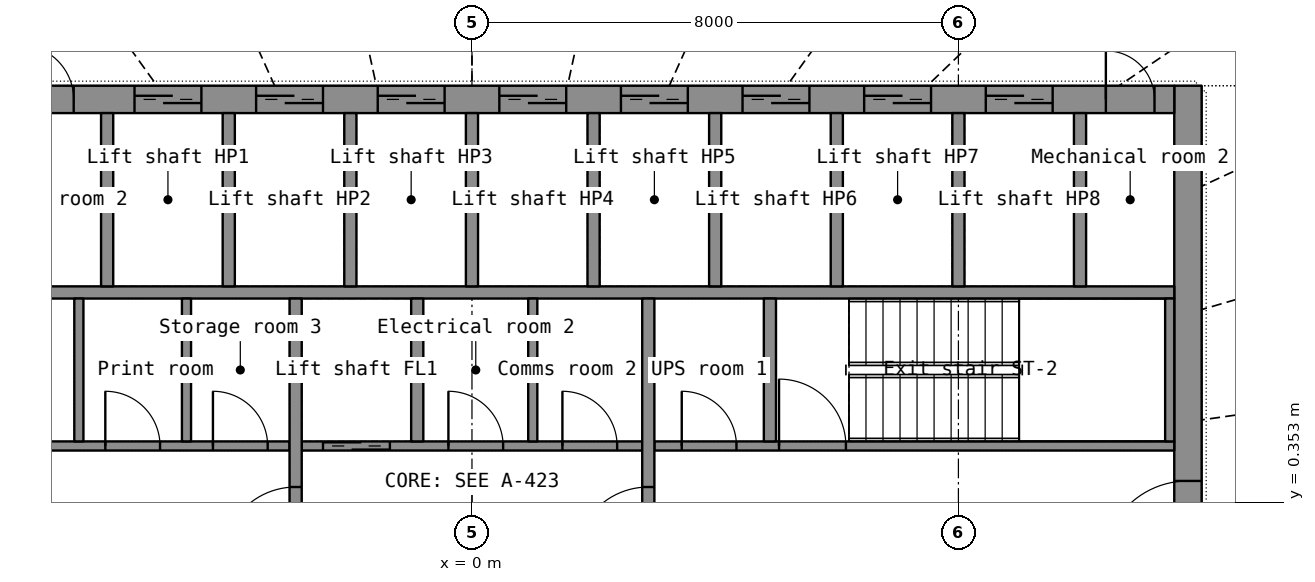
"""IFC4 building model, lengths in metres.
Left out: names, types, materials, properties, quantities, classifications, styles, units other than length and angle.
Written with IfcOpenShell. Run it as: python <this file> out.ifc"""

import sys

from ifc_helpers import new_model, si_unit, direction, frame, frame_2d, origin, place, context, subcontext, project, spatial, rectangle, extrude, element, fill, save


model = new_model("IFC4")
c1 = context("Model", 3, precision=1e-05, world=origin(), true_north=direction((0.0, 1.0)))
c2 = subcontext(c1, "Body", "Model", "MODEL_VIEW")
j1 = project(units=[si_unit("LENGTHUNIT", "METRE"), si_unit("PLANEANGLEUNIT", "RADIAN")], contexts=[c1])
p1 = place(None, origin())
s1 = spatial("IfcSite", under=j1, at=p1, CompositionType="ELEMENT")
p2 = place(p1, origin())
s2 = spatial("IfcBuilding", under=s1, at=p2, CompositionType="ELEMENT")
p3 = place(p2, frame((0.0, 0.0, 168.2)))
s3 = spatial("IfcBuildingStorey", under=s2, at=p3, CompositionType="ELEMENT", Elevation=168.2)
p4 = place(p3, frame((11.775, -7.2, 0.0), z_axis=(0.0, 0.0, 1.0), x_axis=(0.0, 1.0, 0.0)))
e1 = element("IfcWall", 1, at=p4, inside=s3, PredefinedType="SHEAR", context=c2, shape_type="SweptSolid", body=[
    extrude(rectangle(XDim=14.4, YDim=0.45, at=frame_2d((7.2, 0.0))), origin(), (0.0, 0.0, 1.0), 3.3),
])
p5 = place(p4, frame((6.5, 0.0, 0.0)))
e2 = element("IfcOpeningElement", 2, at=p5, cuts=e1, PredefinedType="OPENING", context=c2, shape_type="SweptSolid", body=[
    extrude(rectangle(XDim=1.4, YDim=2.2, at=frame_2d((0.7, 1.1))), frame((0.0, 0.235, 0.0), z_axis=(0.0, -1.0, 0.0), x_axis=(1.0, 0.0, 0.0)), (0.0, 0.0, 1.0), 0.47),
])
p6 = place(p3, frame((-11.55, 6.975, 0.0), z_axis=(0.0, 0.0, 1.0), x_axis=(1.0, 0.0, 0.0)))
e3 = element("IfcWall", 3, at=p6, inside=s3, PredefinedType="SHEAR", context=c2, shape_type="SweptSolid", body=[
    extrude(rectangle(XDim=23.1, YDim=0.45, at=frame_2d((11.55, 0.0))), origin(), (0.0, 0.0, 1.0), 3.3),
])
p7 = place(p6, frame((2.0, 0.0, 0.0)))
e4 = element("IfcOpeningElement", 4, at=p7, cuts=e3, PredefinedType="OPENING", context=c2, shape_type="SweptSolid", body=[
    extrude(rectangle(XDim=1.1, YDim=2.2, at=frame_2d((0.55, 1.1))), frame((0.0, 0.235, 0.0), z_axis=(0.0, -1.0, 0.0), x_axis=(1.0, 0.0, 0.0)), (0.0, 0.0, 1.0), 0.47),
])
p8 = place(p6, frame((6.0, 0.0, 0.0)))
e5 = element("IfcOpeningElement", 5, at=p8, cuts=e3, PredefinedType="OPENING", context=c2, shape_type="SweptSolid", body=[
    extrude(rectangle(XDim=1.1, YDim=2.2, at=frame_2d((0.55, 1.1))), frame((0.0, 0.235, 0.0), z_axis=(0.0, -1.0, 0.0), x_axis=(1.0, 0.0, 0.0)), (0.0, 0.0, 1.0), 0.47),
])
p9 = place(p6, frame((8.0, 0.0, 0.0)))
e6 = element("IfcOpeningElement", 6, at=p9, cuts=e3, PredefinedType="OPENING", context=c2, shape_type="SweptSolid", body=[
    extrude(rectangle(XDim=1.1, YDim=2.2, at=frame_2d((0.55, 1.1))), frame((0.0, 0.235, 0.0), z_axis=(0.0, -1.0, 0.0), x_axis=(1.0, 0.0, 0.0)), (0.0, 0.0, 1.0), 0.47),
])
p10 = place(p6, frame((10.0, 0.0, 0.0)))
e7 = element("IfcOpeningElement", 7, at=p10, cuts=e3, PredefinedType="OPENING", context=c2, shape_type="SweptSolid", body=[
    extrude(rectangle(XDim=1.1, YDim=2.2, at=frame_2d((0.55, 1.1))), frame((0.0, 0.235, 0.0), z_axis=(0.0, -1.0, 0.0), x_axis=(1.0, 0.0, 0.0)), (0.0, 0.0, 1.0), 0.47),
])
p11 = place(p6, frame((12.0, 0.0, 0.0)))
e8 = element("IfcOpeningElement", 8, at=p11, cuts=e3, PredefinedType="OPENING", context=c2, shape_type="SweptSolid", body=[
    extrude(rectangle(XDim=1.1, YDim=2.2, at=frame_2d((0.55, 1.1))), frame((0.0, 0.235, 0.0), z_axis=(0.0, -1.0, 0.0), x_axis=(1.0, 0.0, 0.0)), (0.0, 0.0, 1.0), 0.47),
])
p12 = place(p6, frame((14.0, 0.0, 0.0)))
e9 = element("IfcOpeningElement", 9, at=p12, cuts=e3, PredefinedType="OPENING", context=c2, shape_type="SweptSolid", body=[
    extrude(rectangle(XDim=1.1, YDim=2.2, at=frame_2d((0.55, 1.1))), frame((0.0, 0.235, 0.0), z_axis=(0.0, -1.0, 0.0), x_axis=(1.0, 0.0, 0.0)), (0.0, 0.0, 1.0), 0.47),
])
p13 = place(p6, frame((16.0, 0.0, 0.0)))
e10 = element("IfcOpeningElement", 10, at=p13, cuts=e3, PredefinedType="OPENING", context=c2, shape_type="SweptSolid", body=[
    extrude(rectangle(XDim=1.1, YDim=2.2, at=frame_2d((0.55, 1.1))), frame((0.0, 0.235, 0.0), z_axis=(0.0, -1.0, 0.0), x_axis=(1.0, 0.0, 0.0)), (0.0, 0.0, 1.0), 0.47),
])
p14 = place(p6, frame((18.0, 0.0, 0.0)))
e11 = element("IfcOpeningElement", 11, at=p14, cuts=e3, PredefinedType="OPENING", context=c2, shape_type="SweptSolid", body=[
    extrude(rectangle(XDim=1.1, YDim=2.2, at=frame_2d((0.55, 1.1))), frame((0.0, 0.235, 0.0), z_axis=(0.0, -1.0, 0.0), x_axis=(1.0, 0.0, 0.0)), (0.0, 0.0, 1.0), 0.47),
])
p15 = place(p6, frame((20.0, 0.0, 0.0)))
e12 = element("IfcOpeningElement", 12, at=p15, cuts=e3, PredefinedType="OPENING", context=c2, shape_type="SweptSolid", body=[
    extrude(rectangle(XDim=1.1, YDim=2.2, at=frame_2d((0.55, 1.1))), frame((0.0, 0.235, 0.0), z_axis=(0.0, -1.0, 0.0), x_axis=(1.0, 0.0, 0.0)), (0.0, 0.0, 1.0), 0.47),
])
p16 = place(p6, frame((4.1, 0.0, 0.0)))
e13 = element("IfcOpeningElement", 13, at=p16, cuts=e3, PredefinedType="OPENING", context=c2, shape_type="SweptSolid", body=[
    extrude(rectangle(XDim=0.9, YDim=2.1, at=frame_2d((0.45, 1.05))), frame((0.0, 0.235, 0.0), z_axis=(0.0, -1.0, 0.0), x_axis=(1.0, 0.0, 0.0)), (0.0, 0.0, 1.0), 0.47),
])
p17 = place(p6, frame((0.325, 0.0, 0.0)))
e14 = element("IfcOpeningElement", 14, at=p17, cuts=e3, PredefinedType="OPENING", context=c2, shape_type="SweptSolid", body=[
    extrude(rectangle(XDim=0.8, YDim=2.05, at=frame_2d((0.4, 1.025))), frame((0.0, 0.235, 0.0), z_axis=(0.0, -1.0, 0.0), x_axis=(1.0, 0.0, 0.0)), (0.0, 0.0, 1.0), 0.47),
])
p18 = place(p6, frame((21.975, 0.0, 0.0)))
e15 = element("IfcOpeningElement", 15, at=p18, cuts=e3, PredefinedType="OPENING", context=c2, shape_type="SweptSolid", body=[
    extrude(rectangle(XDim=0.8, YDim=2.05, at=frame_2d((0.4, 1.025))), frame((0.0, 0.235, 0.0), z_axis=(0.0, -1.0, 0.0), x_axis=(1.0, 0.0, 0.0)), (0.0, 0.0, 1.0), 0.47),
])
p19 = place(p3, frame((-11.55, 3.8, 0.0), z_axis=(0.0, 0.0, 1.0), x_axis=(1.0, 0.0, 0.0)))
e16 = element("IfcWall", 16, at=p19, inside=s3, PredefinedType="SHEAR", context=c2, shape_type="SweptSolid", body=[
    extrude(rectangle(XDim=23.1, YDim=0.2, at=frame_2d((11.55, 0.0))), origin(), (0.0, 0.0, 1.0), 3.3),
])
for number, where, z_axis, x_axis in (
    (17, (-6.0, 3.9, 0.0), (0.0, 0.0, 1.0), (0.0, 1.0, 0.0)),
    (18, (-4.0, 3.9, 0.0), (0.0, 0.0, 1.0), (0.0, 1.0, 0.0)),
    (19, (-2.0, 3.9, 0.0), (0.0, 0.0, 1.0), (0.0, 1.0, 0.0)),
    (20, (0.0, 3.9, 0.0), (0.0, 0.0, 1.0), (0.0, 1.0, 0.0)),
    (21, (2.0, 3.9, 0.0), (0.0, 0.0, 1.0), (0.0, 1.0, 0.0)),
    (22, (4.0, 3.9, 0.0), (0.0, 0.0, 1.0), (0.0, 1.0, 0.0)),
    (23, (6.0, 3.9, 0.0), (0.0, 0.0, 1.0), (0.0, 1.0, 0.0)),
    (24, (8.0, 3.9, 0.0), (0.0, 0.0, 1.0), (0.0, 1.0, 0.0)),
    (25, (10.0, 3.9, 0.0), (0.0, 0.0, 1.0), (0.0, 1.0, 0.0)),
):
    element("IfcWall", number, at=place(p3, frame(where, z_axis=z_axis, x_axis=x_axis)), inside=s3, PredefinedType="SHEAR", context=c2, shape_type="SweptSolid", body=[
        extrude(rectangle(XDim=2.85, YDim=0.2, at=frame_2d((1.425, 0.0))), origin(), (0.0, 0.0, 1.0), 3.3),
    ])
p20 = place(p3, frame((-11.55, 1.275, 0.0), z_axis=(0.0, 0.0, 1.0), x_axis=(1.0, 0.0, 0.0)))
e26 = element("IfcWall", 26, at=p20, inside=s3, PredefinedType="PARTITIONING", context=c2, shape_type="SweptSolid", body=[
    extrude(rectangle(XDim=8.55, YDim=0.15, at=frame_2d((4.275, 0.0))), origin(), (0.0, 0.0, 1.0), 3.3),
])
p21 = place(p20, frame((0.79, 0.0, 0.0)))
e27 = element("IfcOpeningElement", 27, at=p21, cuts=e26, PredefinedType="OPENING", context=c2, shape_type="SweptSolid", body=[
    extrude(rectangle(XDim=0.85, YDim=2.1, at=frame_2d((0.425, 1.05))), frame((0.0, 0.085, 0.0), z_axis=(0.0, -1.0, 0.0), x_axis=(1.0, 0.0, 0.0)), (0.0, 0.0, 1.0), 0.17),
])
p22 = place(p20, frame((3.37, 0.0, 0.0)))
e28 = element("IfcOpeningElement", 28, at=p22, cuts=e26, PredefinedType="OPENING", context=c2, shape_type="SweptSolid", body=[
    extrude(rectangle(XDim=0.85, YDim=2.1, at=frame_2d((0.425, 1.05))), frame((0.0, 0.085, 0.0), z_axis=(0.0, -1.0, 0.0), x_axis=(1.0, 0.0, 0.0)), (0.0, 0.0, 1.0), 0.17),
])
p23 = place(p20, frame((5.52, 0.0, 0.0)))
e29 = element("IfcOpeningElement", 29, at=p23, cuts=e26, PredefinedType="OPENING", context=c2, shape_type="SweptSolid", body=[
    extrude(rectangle(XDim=0.9, YDim=2.1, at=frame_2d((0.45, 1.05))), frame((0.0, 0.085, 0.0), z_axis=(0.0, -1.0, 0.0), x_axis=(1.0, 0.0, 0.0)), (0.0, 0.0, 1.0), 0.17),
])
p24 = place(p20, frame((7.29, 0.0, 0.0)))
e30 = element("IfcOpeningElement", 30, at=p24, cuts=e26, PredefinedType="OPENING", context=c2, shape_type="SweptSolid", body=[
    extrude(rectangle(XDim=0.9, YDim=2.1, at=frame_2d((0.45, 1.05))), frame((0.0, 0.085, 0.0), z_axis=(0.0, -1.0, 0.0), x_axis=(1.0, 0.0, 0.0)), (0.0, 0.0, 1.0), 0.17),
])
p25 = place(p3, frame((-2.8, 1.275, 0.0), z_axis=(0.0, 0.0, 1.0), x_axis=(1.0, 0.0, 0.0)))
e31 = element("IfcWall", 31, at=p25, inside=s3, PredefinedType="SHEAR", context=c2, shape_type="SweptSolid", body=[
    extrude(rectangle(XDim=5.6, YDim=0.15, at=frame_2d((2.8, 0.0))), origin(), (0.0, 0.0, 1.0), 3.3),
])
p26 = place(p25, frame((0.35, 0.0, 0.0)))
e32 = element("IfcOpeningElement", 32, at=p26, cuts=e31, PredefinedType="OPENING", context=c2, shape_type="SweptSolid", body=[
    extrude(rectangle(XDim=1.1, YDim=2.2, at=frame_2d((0.55, 1.1))), frame((0.0, 0.085, 0.0), z_axis=(0.0, -1.0, 0.0), x_axis=(1.0, 0.0, 0.0)), (0.0, 0.0, 1.0), 0.17),
])
p27 = place(p25, frame((2.413, 0.0, 0.0)))
e33 = element("IfcOpeningElement", 33, at=p27, cuts=e31, PredefinedType="OPENING", context=c2, shape_type="SweptSolid", body=[
    extrude(rectangle(XDim=0.9, YDim=2.1, at=frame_2d((0.45, 1.05))), frame((0.0, 0.085, 0.0), z_axis=(0.0, -1.0, 0.0), x_axis=(1.0, 0.0, 0.0)), (0.0, 0.0, 1.0), 0.17),
])
p28 = place(p25, frame((4.288, 0.0, 0.0)))
e34 = element("IfcOpeningElement", 34, at=p28, cuts=e31, PredefinedType="OPENING", context=c2, shape_type="SweptSolid", body=[
    extrude(rectangle(XDim=0.9, YDim=2.1, at=frame_2d((0.45, 1.05))), frame((0.0, 0.085, 0.0), z_axis=(0.0, -1.0, 0.0), x_axis=(1.0, 0.0, 0.0)), (0.0, 0.0, 1.0), 0.17),
])
p29 = place(p3, frame((3.0, 1.275, 0.0), z_axis=(0.0, 0.0, 1.0), x_axis=(1.0, 0.0, 0.0)))
e35 = element("IfcWall", 35, at=p29, inside=s3, PredefinedType="SHEAR", context=c2, shape_type="SweptSolid", body=[
    extrude(rectangle(XDim=8.55, YDim=0.15, at=frame_2d((4.275, 0.0))), origin(), (0.0, 0.0, 1.0), 3.3),
])
p30 = place(p29, frame((2.05, 0.0, 0.0)))
e36 = element("IfcOpeningElement", 36, at=p30, cuts=e35, PredefinedType="OPENING", context=c2, shape_type="SweptSolid", body=[
    extrude(rectangle(XDim=1.1, YDim=2.15, at=frame_2d((0.55, 1.075))), frame((0.0, 0.085, 0.0), z_axis=(0.0, -1.0, 0.0), x_axis=(1.0, 0.0, 0.0)), (0.0, 0.0, 1.0), 0.17),
])
p31 = place(p29, frame((0.45, 0.0, 0.0)))
e37 = element("IfcOpeningElement", 37, at=p31, cuts=e35, PredefinedType="OPENING", context=c2, shape_type="SweptSolid", body=[
    extrude(rectangle(XDim=0.9, YDim=2.1, at=frame_2d((0.45, 1.05))), frame((0.0, 0.085, 0.0), z_axis=(0.0, -1.0, 0.0), x_axis=(1.0, 0.0, 0.0)), (0.0, 0.0, 1.0), 0.17),
])
p32 = place(p3, frame((-2.9, -3.7, 0.0), z_axis=(0.0, 0.0, 1.0), x_axis=(0.0, 1.0, 0.0)))
e38 = element("IfcWall", 38, at=p32, inside=s3, PredefinedType="SHEAR", context=c2, shape_type="SweptSolid", body=[
    extrude(rectangle(XDim=7.4, YDim=0.2, at=frame_2d((3.7, 0.0))), origin(), (0.0, 0.0, 1.0), 3.3),
])
p33 = place(p32, frame((3.1, 0.0, 0.0)))
e39 = element("IfcOpeningElement", 39, at=p33, cuts=e38, PredefinedType="OPENING", context=c2, shape_type="SweptSolid", body=[
    extrude(rectangle(XDim=1.2, YDim=2.2, at=frame_2d((0.6, 1.1))), frame((0.0, 0.11, 0.0), z_axis=(0.0, -1.0, 0.0), x_axis=(1.0, 0.0, 0.0)), (0.0, 0.0, 1.0), 0.22),
])
p34 = place(p3, frame((2.9, -3.7, 0.0), z_axis=(0.0, 0.0, 1.0), x_axis=(0.0, 1.0, 0.0)))
e40 = element("IfcWall", 40, at=p34, inside=s3, PredefinedType="SHEAR", context=c2, shape_type="SweptSolid", body=[
    extrude(rectangle(XDim=7.4, YDim=0.2, at=frame_2d((3.7, 0.0))), origin(), (0.0, 0.0, 1.0), 3.3),
])
p35 = place(p34, frame((3.1, 0.0, 0.0)))
e41 = element("IfcOpeningElement", 41, at=p35, cuts=e40, PredefinedType="OPENING", context=c2, shape_type="SweptSolid", body=[
    extrude(rectangle(XDim=1.2, YDim=2.2, at=frame_2d((0.6, 1.1))), frame((0.0, 0.11, 0.0), z_axis=(0.0, -1.0, 0.0), x_axis=(1.0, 0.0, 0.0)), (0.0, 0.0, 1.0), 0.22),
])
p36 = place(p3, frame((-0.9, 1.35, 0.0), z_axis=(0.0, 0.0, 1.0), x_axis=(0.0, 1.0, 0.0)))
e42 = element("IfcWall", 42, at=p36, inside=s3, PredefinedType="SHEAR", context=c2, shape_type="SweptSolid", body=[
    extrude(rectangle(XDim=2.35, YDim=0.2, at=frame_2d((1.175, 0.0))), origin(), (0.0, 0.0, 1.0), 3.3),
])
p37 = place(p3, frame((11.475, 1.35, 0.0), z_axis=(0.0, 0.0, 1.0), x_axis=(0.0, 1.0, 0.0)))
e43 = element("IfcWall", 43, at=p37, inside=s3, PredefinedType="SHEAR", context=c2, shape_type="SweptSolid", body=[
    extrude(rectangle(XDim=2.35, YDim=0.15, at=frame_2d((1.175, 0.0))), origin(), (0.0, 0.0, 1.0), 3.3),
])
p38 = place(p3, frame((4.9, 1.35, 0.0), z_axis=(0.0, 0.0, 1.0), x_axis=(0.0, 1.0, 0.0)))
e44 = element("IfcWall", 44, at=p38, inside=s3, PredefinedType="SHEAR", context=c2, shape_type="SweptSolid", body=[
    extrude(rectangle(XDim=2.35, YDim=0.2, at=frame_2d((1.175, 0.0))), origin(), (0.0, 0.0, 1.0), 3.3),
])
for number, where, z_axis, x_axis in (
    (45, (-6.465, 1.35, 0.0), (0.0, 0.0, 1.0), (0.0, 1.0, 0.0)),
    (46, (-4.695, 1.35, 0.0), (0.0, 0.0, 1.0), (0.0, 1.0, 0.0)),
    (47, (1.0, 1.35, 0.0), (0.0, 0.0, 1.0), (0.0, 1.0, 0.0)),
):
    element("IfcWall", number, at=place(p3, frame(where, z_axis=z_axis, x_axis=x_axis)), inside=s3, PredefinedType="PARTITIONING", context=c2, shape_type="SweptSolid", body=[
        extrude(rectangle(XDim=2.35, YDim=0.15, at=frame_2d((1.175, 0.0))), origin(), (0.0, 0.0, 1.0), 3.3),
    ])
p39 = place(p8, origin())
e48 = element("IfcDoor", 48, at=p39, inside=s3, OperationType="DOUBLE_DOOR_SLIDING", PredefinedType="DOOR", context=c2, shape_type="SweptSolid", body=[
    extrude(rectangle(XDim=1.1, YDim=2.2, at=frame_2d((0.55, 1.1))), frame((0.0, 0.025, 0.0), z_axis=(0.0, -1.0, 0.0), x_axis=(1.0, 0.0, 0.0)), (0.0, 0.0, 1.0), 0.05),
])
fill(e5, e48)
p40 = place(p9, origin())
e49 = element("IfcDoor", 49, at=p40, inside=s3, OperationType="DOUBLE_DOOR_SLIDING", PredefinedType="DOOR", context=c2, shape_type="SweptSolid", body=[
    extrude(rectangle(XDim=1.1, YDim=2.2, at=frame_2d((0.55, 1.1))), frame((0.0, 0.025, 0.0), z_axis=(0.0, -1.0, 0.0), x_axis=(1.0, 0.0, 0.0)), (0.0, 0.0, 1.0), 0.05),
])
fill(e6, e49)
p41 = place(p10, origin())
e50 = element("IfcDoor", 50, at=p41, inside=s3, OperationType="DOUBLE_DOOR_SLIDING", PredefinedType="DOOR", context=c2, shape_type="SweptSolid", body=[
    extrude(rectangle(XDim=1.1, YDim=2.2, at=frame_2d((0.55, 1.1))), frame((0.0, 0.025, 0.0), z_axis=(0.0, -1.0, 0.0), x_axis=(1.0, 0.0, 0.0)), (0.0, 0.0, 1.0), 0.05),
])
fill(e7, e50)
p42 = place(p11, origin())
e51 = element("IfcDoor", 51, at=p42, inside=s3, OperationType="DOUBLE_DOOR_SLIDING", PredefinedType="DOOR", context=c2, shape_type="SweptSolid", body=[
    extrude(rectangle(XDim=1.1, YDim=2.2, at=frame_2d((0.55, 1.1))), frame((0.0, 0.025, 0.0), z_axis=(0.0, -1.0, 0.0), x_axis=(1.0, 0.0, 0.0)), (0.0, 0.0, 1.0), 0.05),
])
fill(e8, e51)
p43 = place(p12, origin())
e52 = element("IfcDoor", 52, at=p43, inside=s3, OperationType="DOUBLE_DOOR_SLIDING", PredefinedType="DOOR", context=c2, shape_type="SweptSolid", body=[
    extrude(rectangle(XDim=1.1, YDim=2.2, at=frame_2d((0.55, 1.1))), frame((0.0, 0.025, 0.0), z_axis=(0.0, -1.0, 0.0), x_axis=(1.0, 0.0, 0.0)), (0.0, 0.0, 1.0), 0.05),
])
fill(e9, e52)
p44 = place(p13, origin())
e53 = element("IfcDoor", 53, at=p44, inside=s3, OperationType="DOUBLE_DOOR_SLIDING", PredefinedType="DOOR", context=c2, shape_type="SweptSolid", body=[
    extrude(rectangle(XDim=1.1, YDim=2.2, at=frame_2d((0.55, 1.1))), frame((0.0, 0.025, 0.0), z_axis=(0.0, -1.0, 0.0), x_axis=(1.0, 0.0, 0.0)), (0.0, 0.0, 1.0), 0.05),
])
fill(e10, e53)
p45 = place(p14, origin())
e54 = element("IfcDoor", 54, at=p45, inside=s3, OperationType="DOUBLE_DOOR_SLIDING", PredefinedType="DOOR", context=c2, shape_type="SweptSolid", body=[
    extrude(rectangle(XDim=1.1, YDim=2.2, at=frame_2d((0.55, 1.1))), frame((0.0, 0.025, 0.0), z_axis=(0.0, -1.0, 0.0), x_axis=(1.0, 0.0, 0.0)), (0.0, 0.0, 1.0), 0.05),
])
fill(e11, e54)
p46 = place(p15, origin())
e55 = element("IfcDoor", 55, at=p46, inside=s3, OperationType="DOUBLE_DOOR_SLIDING", PredefinedType="DOOR", context=c2, shape_type="SweptSolid", body=[
    extrude(rectangle(XDim=1.1, YDim=2.2, at=frame_2d((0.55, 1.1))), frame((0.0, 0.025, 0.0), z_axis=(0.0, -1.0, 0.0), x_axis=(1.0, 0.0, 0.0)), (0.0, 0.0, 1.0), 0.05),
])
fill(e12, e55)
p47 = place(p16, origin())
e56 = element("IfcDoor", 56, at=p47, inside=s3, OperationType="SINGLE_SWING_LEFT", PredefinedType="DOOR", context=c2, shape_type="SweptSolid", body=[
    extrude(rectangle(XDim=0.9, YDim=2.1, at=frame_2d((0.45, 1.05))), frame((0.0, 0.025, 0.0), z_axis=(0.0, -1.0, 0.0), x_axis=(1.0, 0.0, 0.0)), (0.0, 0.0, 1.0), 0.05),
])
fill(e13, e56)
p48 = place(p18, origin())
e57 = element("IfcDoor", 57, at=p48, inside=s3, OperationType="SINGLE_SWING_LEFT", PredefinedType="DOOR", context=c2, shape_type="SweptSolid", body=[
    extrude(rectangle(XDim=0.8, YDim=2.05, at=frame_2d((0.4, 1.025))), frame((0.0, 0.025, 0.0), z_axis=(0.0, -1.0, 0.0), x_axis=(1.0, 0.0, 0.0)), (0.0, 0.0, 1.0), 0.05),
])
fill(e15, e57)
p49 = place(p5, origin())
e58 = element("IfcDoor", 58, at=p49, inside=s3, OperationType="DOUBLE_DOOR_SINGLE_SWING", PredefinedType="DOOR", context=c2, shape_type="SweptSolid", body=[
    extrude(rectangle(XDim=1.4, YDim=2.2, at=frame_2d((0.7, 1.1))), frame((0.0, 0.025, 0.0), z_axis=(0.0, -1.0, 0.0), x_axis=(1.0, 0.0, 0.0)), (0.0, 0.0, 1.0), 0.05),
])
fill(e2, e58)
p50 = place(p33, origin())
e59 = element("IfcDoor", 59, at=p50, inside=s3, OperationType="SINGLE_SWING_LEFT", PredefinedType="DOOR", context=c2, shape_type="SweptSolid", body=[
    extrude(rectangle(XDim=1.2, YDim=2.2, at=frame_2d((0.6, 1.1))), frame((0.0, 0.025, 0.0), z_axis=(0.0, -1.0, 0.0), x_axis=(1.0, 0.0, 0.0)), (0.0, 0.0, 1.0), 0.05),
])
fill(e39, e59)
p51 = place(p35, origin())
e60 = element("IfcDoor", 60, at=p51, inside=s3, OperationType="SINGLE_SWING_LEFT", PredefinedType="DOOR", context=c2, shape_type="SweptSolid", body=[
    extrude(rectangle(XDim=1.2, YDim=2.2, at=frame_2d((0.6, 1.1))), frame((0.0, 0.025, 0.0), z_axis=(0.0, -1.0, 0.0), x_axis=(1.0, 0.0, 0.0)), (0.0, 0.0, 1.0), 0.05),
])
fill(e41, e60)
p52 = place(p26, origin())
e61 = element("IfcDoor", 61, at=p52, inside=s3, OperationType="DOUBLE_DOOR_SLIDING", PredefinedType="DOOR", context=c2, shape_type="SweptSolid", body=[
    extrude(rectangle(XDim=1.1, YDim=2.2, at=frame_2d((0.55, 1.1))), frame((0.0, 0.025, 0.0), z_axis=(0.0, -1.0, 0.0), x_axis=(1.0, 0.0, 0.0)), (0.0, 0.0, 1.0), 0.05),
])
fill(e32, e61)
p53 = place(p30, origin())
e62 = element("IfcDoor", 62, at=p53, inside=s3, OperationType="SINGLE_SWING_LEFT", PredefinedType="DOOR", context=c2, shape_type="SweptSolid", body=[
    extrude(rectangle(XDim=1.1, YDim=2.15, at=frame_2d((0.55, 1.075))), frame((0.0, 0.025, 0.0), z_axis=(0.0, -1.0, 0.0), x_axis=(1.0, 0.0, 0.0)), (0.0, 0.0, 1.0), 0.05),
])
fill(e36, e62)
p54 = place(p23, origin())
e63 = element("IfcDoor", 63, at=p54, inside=s3, OperationType="SINGLE_SWING_LEFT", PredefinedType="DOOR", context=c2, shape_type="SweptSolid", body=[
    extrude(rectangle(XDim=0.9, YDim=2.1, at=frame_2d((0.45, 1.05))), frame((0.0, 0.025, 0.0), z_axis=(0.0, -1.0, 0.0), x_axis=(1.0, 0.0, 0.0)), (0.0, 0.0, 1.0), 0.05),
])
fill(e29, e63)
p55 = place(p24, origin())
e64 = element("IfcDoor", 64, at=p55, inside=s3, OperationType="SINGLE_SWING_LEFT", PredefinedType="DOOR", context=c2, shape_type="SweptSolid", body=[
    extrude(rectangle(XDim=0.9, YDim=2.1, at=frame_2d((0.45, 1.05))), frame((0.0, 0.025, 0.0), z_axis=(0.0, -1.0, 0.0), x_axis=(1.0, 0.0, 0.0)), (0.0, 0.0, 1.0), 0.05),
])
fill(e30, e64)
p56 = place(p27, origin())
e65 = element("IfcDoor", 65, at=p56, inside=s3, OperationType="SINGLE_SWING_LEFT", PredefinedType="DOOR", context=c2, shape_type="SweptSolid", body=[
    extrude(rectangle(XDim=0.9, YDim=2.1, at=frame_2d((0.45, 1.05))), frame((0.0, 0.025, 0.0), z_axis=(0.0, -1.0, 0.0), x_axis=(1.0, 0.0, 0.0)), (0.0, 0.0, 1.0), 0.05),
])
fill(e33, e65)
p57 = place(p28, origin())
e66 = element("IfcDoor", 66, at=p57, inside=s3, OperationType="SINGLE_SWING_LEFT", PredefinedType="DOOR", context=c2, shape_type="SweptSolid", body=[
    extrude(rectangle(XDim=0.9, YDim=2.1, at=frame_2d((0.45, 1.05))), frame((0.0, 0.025, 0.0), z_axis=(0.0, -1.0, 0.0), x_axis=(1.0, 0.0, 0.0)), (0.0, 0.0, 1.0), 0.05),
])
fill(e34, e66)
p58 = place(p31, origin())
e67 = element("IfcDoor", 67, at=p58, inside=s3, OperationType="SINGLE_SWING_LEFT", PredefinedType="DOOR", context=c2, shape_type="SweptSolid", body=[
    extrude(rectangle(XDim=0.9, YDim=2.1, at=frame_2d((0.45, 1.05))), frame((0.0, 0.025, 0.0), z_axis=(0.0, -1.0, 0.0), x_axis=(1.0, 0.0, 0.0)), (0.0, 0.0, 1.0), 0.05),
])
fill(e37, e67)
save(model, sys.argv[1])
